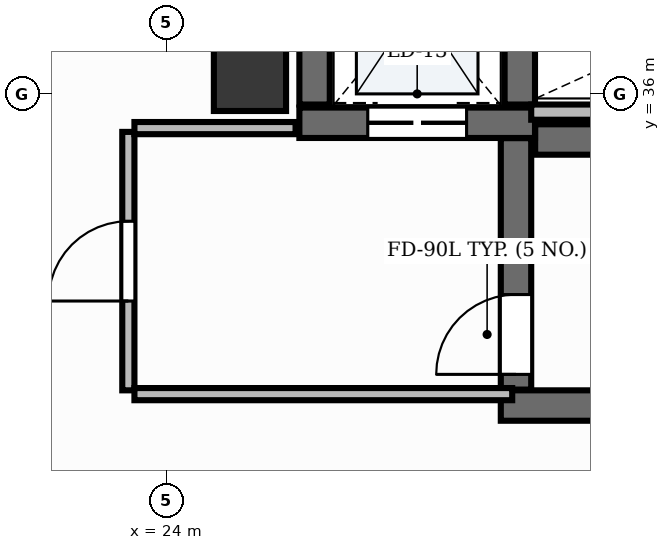
"""IFC4 building model, lengths in metres.
Left out: names, types, materials, properties, quantities, classifications, styles, units other than length and angle.
Written with IfcOpenShell. Run it as: python <this file> out.ifc"""

import sys

from ifc_helpers import new_model, si_unit, direction, frame, frame_2d, origin, origin_2d, place, context, subcontext, project, spatial, rectangle, extrude, element, fill, save


model = new_model("IFC4")
c1 = context("Model", 3, precision=1e-05, world=origin(), true_north=direction((0.0, 1.0)))
c2 = subcontext(c1, "Body", "Model", "MODEL_VIEW")
j1 = project(units=[si_unit("LENGTHUNIT", "METRE"), si_unit("PLANEANGLEUNIT", "RADIAN")], contexts=[c1])
p1 = place(None, origin())
s1 = spatial("IfcSite", under=j1, at=p1, CompositionType="ELEMENT")
p2 = place(p1, origin())
s2 = spatial("IfcBuilding", under=s1, at=p2, CompositionType="ELEMENT")
p3 = place(p2, frame((0.0, 0.0, 192.0)))
s3 = spatial("IfcBuildingStorey", under=s2, at=p3, CompositionType="ELEMENT", Elevation=192.0)
p4 = place(p3, frame((28.852, 35.4, 0.0), z_axis=(0.0, 0.0, 1.0), x_axis=(1.0, 0.0, 0.0)))
e1 = element("IfcWall", 1, at=p4, inside=s3, PredefinedType="SHEAR", context=c2, shape_type="SweptSolid", body=[
    extrude(rectangle(XDim=8.198, YDim=0.4, at=frame_2d((4.099, 0.0))), origin(), (0.0, 0.0, 1.0), 3.9),
])
p5 = place(p3, frame((28.4, 31.9, 0.0), z_axis=(0.0, 0.0, 1.0), x_axis=(1.0, 0.0, 0.0)))
e2 = element("IfcWall", 2, at=p5, inside=s3, PredefinedType="SHEAR", context=c2, shape_type="SweptSolid", body=[
    extrude(rectangle(XDim=8.65, YDim=0.4, at=frame_2d((4.325, 0.0))), origin(), (0.0, 0.0, 1.0), 3.9),
])
p6 = place(p3, frame((28.6, 32.11, 0.0), z_axis=(0.0, 0.0, 1.0), x_axis=(0.0, 1.0, 0.0)))
e3 = element("IfcWall", 3, at=p6, inside=s3, PredefinedType="SHEAR", context=c2, shape_type="SweptSolid", body=[
    extrude(rectangle(XDim=3.308, YDim=0.4, at=frame_2d((1.654, 0.0))), origin(), (0.0, 0.0, 1.0), 3.9),
])
p7 = place(p6, frame((0.2, 0.0, 0.0)))
e4 = element("IfcOpeningElement", 4, at=p7, cuts=e3, PredefinedType="OPENING", context=c2, shape_type="SweptSolid", body=[
    extrude(rectangle(XDim=1.05, YDim=2.15, at=frame_2d((0.525, 1.075))), frame((0.0, 0.215, 0.0), z_axis=(0.0, -1.0, 0.0), x_axis=(1.0, 0.0, 0.0)), (0.0, 0.0, 1.0), 0.43),
])
p8 = place(p3, frame((25.75, 35.62, 0.0), z_axis=(0.0, 0.0, 1.0), x_axis=(1.0, 0.0, 0.0)))
e5 = element("IfcWall", 5, at=p8, inside=s3, PredefinedType="SHEAR", context=c2, shape_type="SweptSolid", body=[
    extrude(rectangle(XDim=3.1, YDim=0.4, at=frame_2d((1.55, 0.0))), origin(), (0.0, 0.0, 1.0), 3.9),
])
p9 = place(p8, frame((0.9, 0.0, 0.0)))
e6 = element("IfcOpeningElement", 6, at=p9, cuts=e5, PredefinedType="OPENING", context=c2, shape_type="SweptSolid", body=[
    extrude(rectangle(XDim=1.3, YDim=2.2, at=frame_2d((0.65, 1.1))), frame((0.0, 0.215, 0.0), z_axis=(0.0, -1.0, 0.0), x_axis=(1.0, 0.0, 0.0)), (0.0, 0.0, 1.0), 0.43),
])
for number, where, z_axis, x_axis in (
    (7, (25.95, 35.86, 0.0), (0.0, 0.0, 1.0), (0.0, 1.0, 0.0)),
    (8, (28.65, 35.86, 0.0), (0.0, 0.0, 1.0), (0.0, 1.0, 0.0)),
):
    element("IfcWall", number, at=place(p3, frame(where, z_axis=z_axis, x_axis=x_axis)), inside=s3, PredefinedType="SHEAR", context=c2, shape_type="SweptSolid", body=[
        extrude(rectangle(XDim=2.7, YDim=0.4, at=frame_2d((1.35, 0.0))), origin(), (0.0, 0.0, 1.0), 3.9),
    ])
p10 = place(p3, frame((25.1, 36.25, -0.0), z_axis=(0.0, 0.0, 1.0), x_axis=(1.0, 0.0, 0.0)))
e9 = element("IfcColumn", 9, at=p10, inside=s3, PredefinedType="PILASTER", context=c2, shape_type="SweptSolid", body=[
    extrude(rectangle(XDim=0.95, YDim=0.95, at=origin_2d()), origin(), (0.0, 0.0, 1.0), 3.901),
])
p11 = place(p3, frame((28.8, 35.76, 0.0), z_axis=(0.0, 0.0, 1.0), x_axis=(1.0, 0.0, 0.0)))
e10 = element("IfcWall", 10, at=p11, inside=s3, PredefinedType="PARTITIONING", context=c2, shape_type="SweptSolid", body=[
    extrude(rectangle(XDim=4.57, YDim=0.2, at=frame_2d((2.285, 0.0))), origin(), (0.0, 0.0, 1.0), 2.91),
])
p12 = place(p3, frame((23.5, 32.1, 0.0), z_axis=(0.0, 0.0, 1.0), x_axis=(0.0, 1.0, 0.0)))
e11 = element("IfcWall", 11, at=p12, inside=s3, PredefinedType="PARTITIONING", context=c2, shape_type="SweptSolid", body=[
    extrude(rectangle(XDim=3.4, YDim=0.16, at=frame_2d((1.7, 0.0))), origin(), (0.0, 0.0, 1.0), 2.91),
])
p13 = place(p12, frame((1.175, 0.0, 0.0)))
e12 = element("IfcOpeningElement", 12, at=p13, cuts=e11, PredefinedType="OPENING", context=c2, shape_type="SweptSolid", body=[
    extrude(rectangle(XDim=1.05, YDim=2.15, at=frame_2d((0.525, 1.075))), frame((0.0, 0.095, 0.0), z_axis=(0.0, -1.0, 0.0), x_axis=(1.0, 0.0, 0.0)), (0.0, 0.0, 1.0), 0.19),
])
p14 = place(p3, frame((23.58, 32.05, 0.0), z_axis=(0.0, 0.0, 1.0), x_axis=(1.0, 0.0, 0.0)))
e13 = element("IfcWall", 13, at=p14, inside=s3, PredefinedType="PARTITIONING", context=c2, shape_type="SweptSolid", body=[
    extrude(rectangle(XDim=4.97, YDim=0.16, at=frame_2d((2.485, 0.0))), origin(), (0.0, 0.0, 1.0), 2.91),
])
p15 = place(p3, frame((23.58, 35.55, 0.0), z_axis=(0.0, 0.0, 1.0), x_axis=(1.0, 0.0, 0.0)))
e14 = element("IfcWall", 14, at=p15, inside=s3, PredefinedType="PARTITIONING", context=c2, shape_type="SweptSolid", body=[
    extrude(rectangle(XDim=2.12, YDim=0.16, at=frame_2d((1.06, 0.0))), origin(), (0.0, 0.0, 1.0), 2.91),
])
p16 = place(p7, origin())
e15 = element("IfcDoor", 15, at=p16, inside=s3, OperationType="SINGLE_SWING_LEFT", PredefinedType="DOOR", context=c2, shape_type="SweptSolid", body=[
    extrude(rectangle(XDim=1.05, YDim=2.15, at=frame_2d((0.525, 1.075))), frame((0.0, 0.025, 0.0), z_axis=(0.0, -1.0, 0.0), x_axis=(1.0, 0.0, 0.0)), (0.0, 0.0, 1.0), 0.05),
])
fill(e4, e15)
p17 = place(p9, origin())
e16 = element("IfcDoor", 16, at=p17, inside=s3, OperationType="DOUBLE_DOOR_SLIDING", PredefinedType="DOOR", context=c2, shape_type="SweptSolid", body=[
    extrude(rectangle(XDim=1.3, YDim=2.2, at=frame_2d((0.65, 1.1))), frame((0.0, 0.025, 0.0), z_axis=(0.0, -1.0, 0.0), x_axis=(1.0, 0.0, 0.0)), (0.0, 0.0, 1.0), 0.05),
])
fill(e6, e16)
p18 = place(p13, origin())
e17 = element("IfcDoor", 17, at=p18, inside=s3, OperationType="SINGLE_SWING_LEFT", PredefinedType="DOOR", context=c2, shape_type="SweptSolid", body=[
    extrude(rectangle(XDim=1.05, YDim=2.15, at=frame_2d((0.525, 1.075))), frame((0.0, 0.025, 0.0), z_axis=(0.0, -1.0, 0.0), x_axis=(1.0, 0.0, 0.0)), (0.0, 0.0, 1.0), 0.05),
])
fill(e12, e17)
save(model, sys.argv[1])
